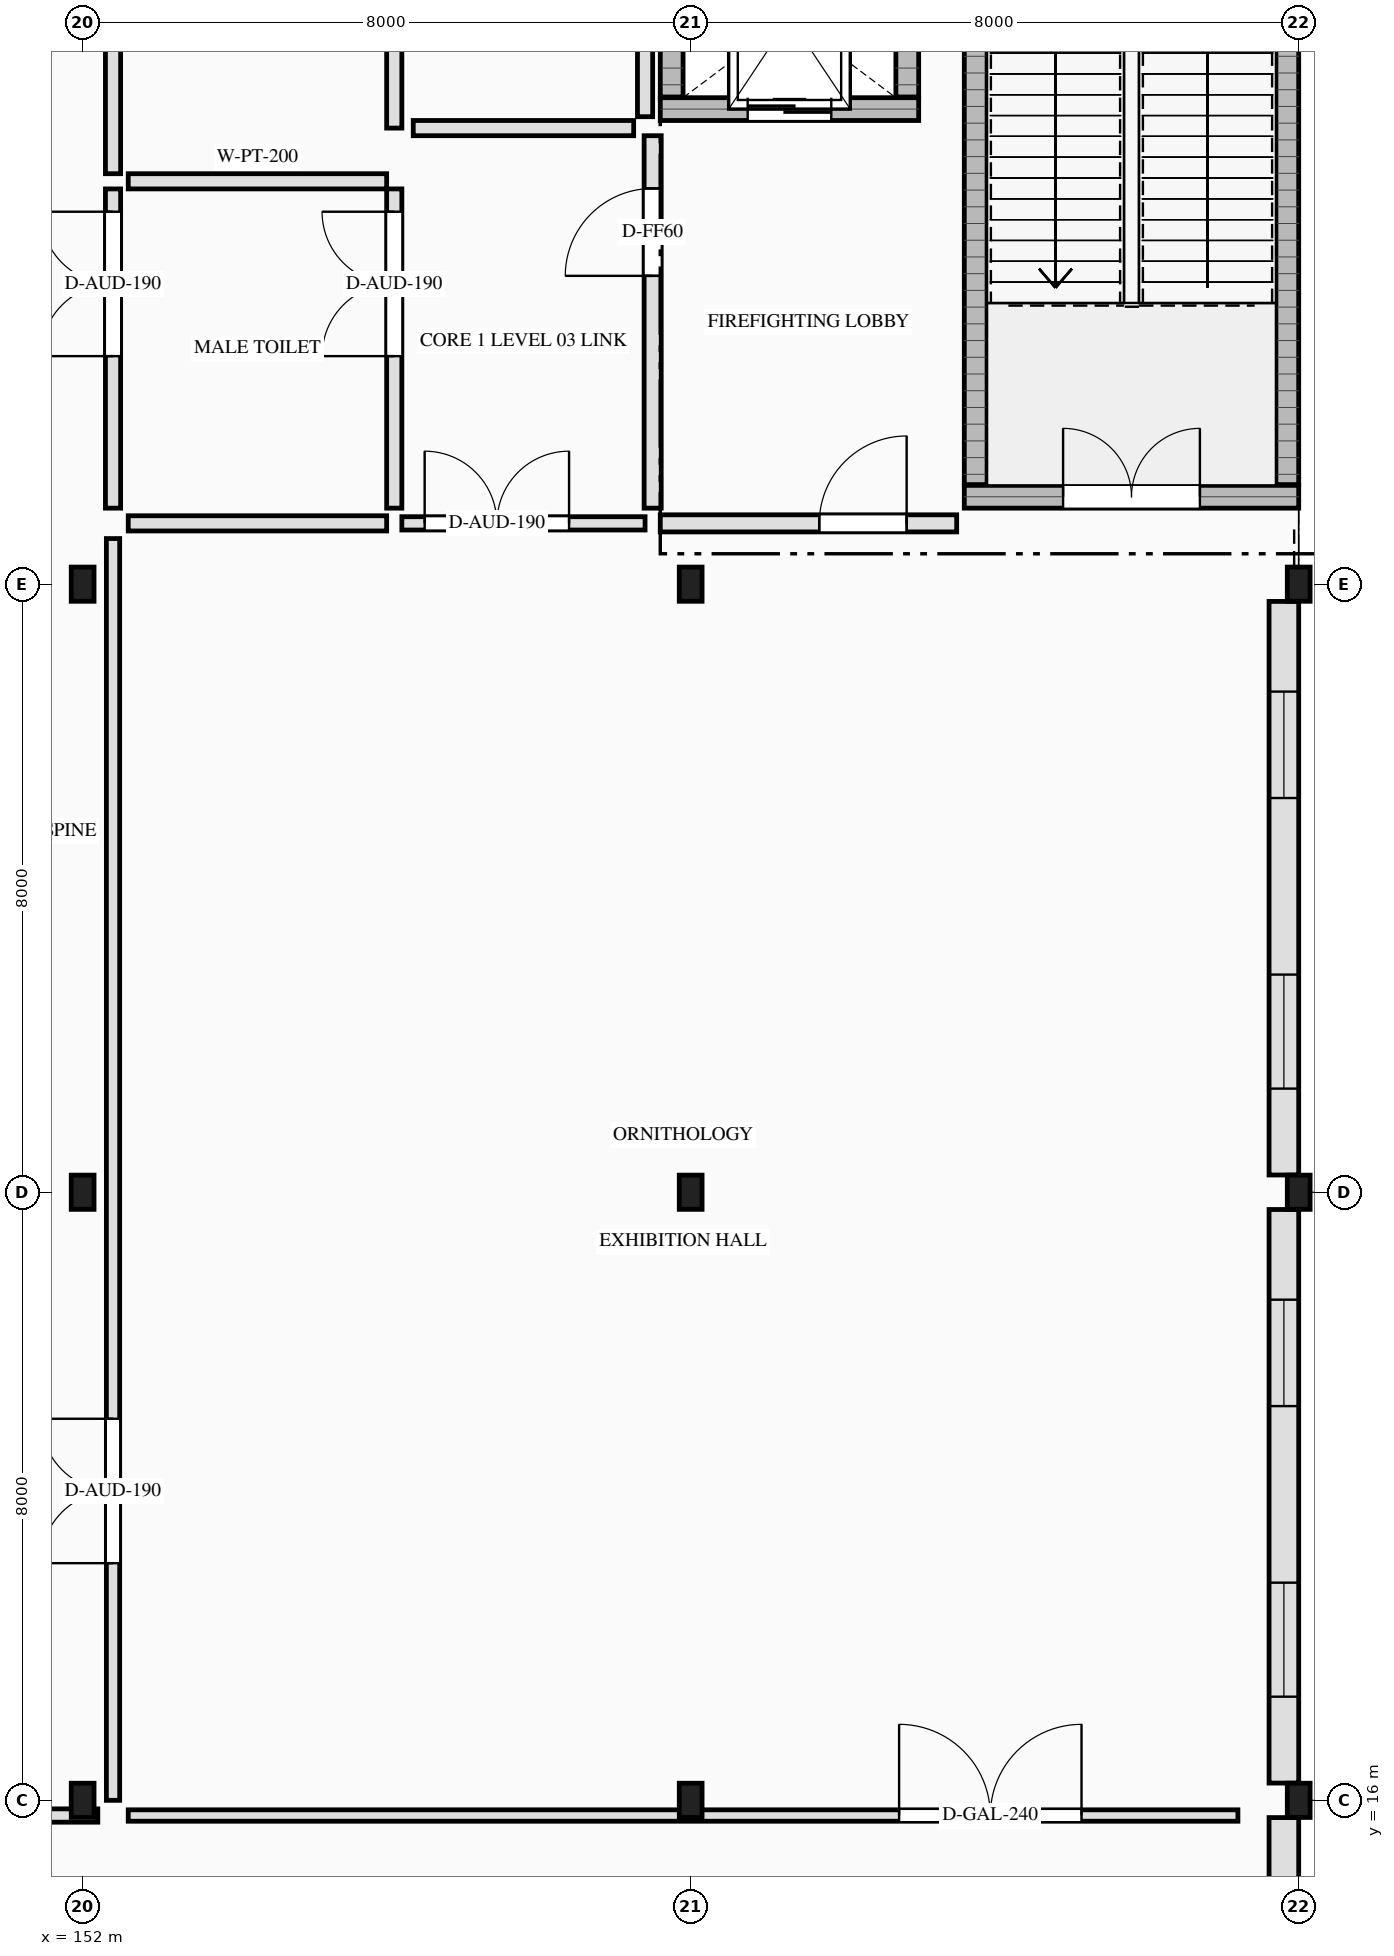
"""IFC4 building model, lengths in metres.
Left out: names, types, materials, properties, quantities, classifications, styles, units other than length and angle.
Written with IfcOpenShell. Run it as: python <this file> out.ifc"""

import sys

from ifc_helpers import new_model, si_unit, direction, frame, frame_2d, origin, origin_2d, place, context, subcontext, project, spatial, rectangle, i_section, extrude, element, fill, save


model = new_model("IFC4")
c1 = context("Model", 3, precision=1e-05, world=origin(), true_north=direction((0.0, 1.0)))
c2 = subcontext(c1, "Body", "Model", "MODEL_VIEW")
j1 = project(units=[si_unit("LENGTHUNIT", "METRE"), si_unit("PLANEANGLEUNIT", "RADIAN")], contexts=[c1])
p1 = place(None, origin())
s1 = spatial("IfcSite", under=j1, at=p1, CompositionType="ELEMENT")
p2 = place(p1, origin())
s2 = spatial("IfcBuilding", under=s1, at=p2, CompositionType="ELEMENT")
p3 = place(p2, frame((0.0, 0.0, 17.6)))
s3 = spatial("IfcBuildingStorey", under=s2, at=p3, CompositionType="ELEMENT", Elevation=17.6)
p4 = place(p3, frame((163.6, 33.15, 0.0), z_axis=(0.0, 0.0, 1.0), x_axis=(1.0, 0.0, 0.0)))
e1 = element("IfcWall", 1, at=p4, inside=s3, PredefinedType="SHEAR", context=c2, shape_type="SweptSolid", body=[
    extrude(rectangle(XDim=4.4, YDim=0.3, at=frame_2d((2.2, 0.0))), origin(), (0.0, 0.0, 1.0), 4.2),
])
p5 = place(p4, frame((1.3, 0.0, 0.0)))
e2 = element("IfcOpeningElement", 2, at=p5, cuts=e1, PredefinedType="OPENING", context=c2, shape_type="SweptSolid", body=[
    extrude(rectangle(XDim=1.8, YDim=2.2, at=frame_2d((0.9, 1.1))), frame((0.0, 0.16, 0.0), z_axis=(0.0, -1.0, 0.0), x_axis=(1.0, 0.0, 0.0)), (0.0, 0.0, 1.0), 0.32),
])
for number, where, z_axis, x_axis in (
    (3, (163.75, 33.31, 0.0), (0.0, 0.0, 1.0), (0.0, 1.0, 0.0)),
    (4, (167.85, 33.31, 0.0), (0.0, 0.0, 1.0), (0.0, 1.0, 0.0)),
):
    element("IfcWall", number, at=place(p3, frame(where, z_axis=z_axis, x_axis=x_axis)), inside=s3, PredefinedType="SHEAR", context=c2, shape_type="SweptSolid", body=[
        extrude(rectangle(XDim=9.38, YDim=0.3, at=frame_2d((4.69, 0.0))), origin(), (0.0, 0.0, 1.0), 4.2),
    ])
p6 = place(p3, frame((159.6, 38.25, 0.0), z_axis=(0.0, 0.0, 1.0), x_axis=(1.0, 0.0, 0.0)))
e5 = element("IfcWall", 5, at=p6, inside=s3, PredefinedType="SHEAR", context=c2, shape_type="SweptSolid", body=[
    extrude(rectangle(XDim=3.4, YDim=0.3, at=frame_2d((1.7, 0.0))), origin(), (0.0, 0.0, 1.0), 4.2),
])
p7 = place(p6, frame((1.15, 0.0, 0.0)))
e6 = element("IfcOpeningElement", 6, at=p7, cuts=e5, PredefinedType="OPENING", context=c2, shape_type="SweptSolid", body=[
    extrude(rectangle(XDim=1.1, YDim=2.15, at=frame_2d((0.55, 1.075))), frame((0.0, 0.16, 0.0), z_axis=(0.0, -1.0, 0.0), x_axis=(1.0, 0.0, 0.0)), (0.0, 0.0, 1.0), 0.32),
])
for number, where, z_axis, x_axis in (
    (7, (159.75, 38.41, 0.0), (0.0, 0.0, 1.0), (0.0, 1.0, 0.0)),
    (8, (162.85, 38.41, 0.0), (0.0, 0.0, 1.0), (0.0, 1.0, 0.0)),
):
    element("IfcWall", number, at=place(p3, frame(where, z_axis=z_axis, x_axis=x_axis)), inside=s3, PredefinedType="SHEAR", context=c2, shape_type="SweptSolid", body=[
        extrude(rectangle(XDim=2.08, YDim=0.3, at=frame_2d((1.04, 0.0))), origin(), (0.0, 0.0, 1.0), 4.2),
    ])
for number, where, z_axis, x_axis in (
    (9, (152.0, 16.0, 0.0), (0.0, 0.0, 1.0), (1.0, 0.0, 0.0)),
    (10, (152.0, 24.0, 0.0), (0.0, 0.0, 1.0), (1.0, 0.0, 0.0)),
    (11, (152.0, 32.0, 0.0), (0.0, 0.0, 1.0), (1.0, 0.0, 0.0)),
    (12, (160.0, 16.0, 0.0), (0.0, 0.0, 1.0), (1.0, 0.0, 0.0)),
    (13, (160.0, 24.0, 0.0), (0.0, 0.0, 1.0), (1.0, 0.0, 0.0)),
    (14, (160.0, 32.0, 0.0), (0.0, 0.0, 1.0), (1.0, 0.0, 0.0)),
    (15, (168.0, 16.0, 0.0), (0.0, 0.0, 1.0), (1.0, 0.0, 0.0)),
    (16, (168.0, 24.0, 0.0), (0.0, 0.0, 1.0), (1.0, 0.0, 0.0)),
    (17, (168.0, 32.0, 0.0), (0.0, 0.0, 1.0), (1.0, 0.0, 0.0)),
):
    element("IfcColumn", number, at=place(p3, frame(where, z_axis=z_axis, x_axis=x_axis)), inside=s3, PredefinedType="COLUMN", context=c2, shape_type="SweptSolid", body=[
        extrude(i_section(OverallWidth=0.3, OverallDepth=0.45, WebThickness=0.014, FlangeThickness=0.026, FilletRadius=0.027, at=origin_2d()), origin(), (0.0, 0.0, 1.0), 4.2),
    ])
p8 = place(p3, frame((167.805, 15.773, 0.0), z_axis=(0.0, 0.0, 1.0), x_axis=(0.0, -1.0, 0.0)))
e18 = element("IfcWall", 18, at=p8, inside=s3, PredefinedType="SOLIDWALL", context=c2, shape_type="SweptSolid", body=[
    extrude(rectangle(XDim=7.546, YDim=0.39, at=frame_2d((3.773, 0.0))), origin(), (0.0, 0.0, 1.0), 3.505),
])
p9 = place(p3, frame((167.805, 23.773, 0.0), z_axis=(0.0, 0.0, 1.0), x_axis=(0.0, -1.0, 0.0)))
e19 = element("IfcWall", 19, at=p9, inside=s3, PredefinedType="SOLIDWALL", context=c2, shape_type="SweptSolid", body=[
    extrude(rectangle(XDim=7.546, YDim=0.39, at=frame_2d((3.773, 0.0))), origin(), (0.0, 0.0, 1.0), 3.505),
])
p10 = place(p9, frame((1.187, 0.0, 0.85)))
e20 = element("IfcOpeningElement", 20, at=p10, cuts=e19, PredefinedType="OPENING", context=c2, shape_type="SweptSolid", body=[
    extrude(rectangle(XDim=1.4, YDim=1.6, at=frame_2d((0.7, 0.8))), frame((0.0, 0.205, 0.0), z_axis=(0.0, -1.0, 0.0), x_axis=(1.0, 0.0, 0.0)), (0.0, 0.0, 1.0), 0.41),
])
p11 = place(p9, frame((4.909, 0.0, 0.85)))
e21 = element("IfcOpeningElement", 21, at=p11, cuts=e19, PredefinedType="OPENING", context=c2, shape_type="SweptSolid", body=[
    extrude(rectangle(XDim=1.5, YDim=2.4, at=frame_2d((0.75, 1.2))), frame((0.0, 0.205, 0.0), z_axis=(0.0, -1.0, 0.0), x_axis=(1.0, 0.0, 0.0)), (0.0, 0.0, 1.0), 0.41),
])
p12 = place(p3, frame((167.805, 31.773, 0.0), z_axis=(0.0, 0.0, 1.0), x_axis=(0.0, -1.0, 0.0)))
e22 = element("IfcWall", 22, at=p12, inside=s3, PredefinedType="SOLIDWALL", context=c2, shape_type="SweptSolid", body=[
    extrude(rectangle(XDim=7.546, YDim=0.39, at=frame_2d((3.773, 0.0))), origin(), (0.0, 0.0, 1.0), 3.505),
])
p13 = place(p12, frame((1.187, 0.0, 0.85)))
e23 = element("IfcOpeningElement", 23, at=p13, cuts=e22, PredefinedType="OPENING", context=c2, shape_type="SweptSolid", body=[
    extrude(rectangle(XDim=1.4, YDim=1.6, at=frame_2d((0.7, 0.8))), frame((0.0, 0.205, 0.0), z_axis=(0.0, -1.0, 0.0), x_axis=(1.0, 0.0, 0.0)), (0.0, 0.0, 1.0), 0.41),
])
p14 = place(p12, frame((4.909, 0.0, 0.85)))
e24 = element("IfcOpeningElement", 24, at=p14, cuts=e22, PredefinedType="OPENING", context=c2, shape_type="SweptSolid", body=[
    extrude(rectangle(XDim=1.5, YDim=2.4, at=frame_2d((0.75, 1.2))), frame((0.0, 0.205, 0.0), z_axis=(0.0, -1.0, 0.0), x_axis=(1.0, 0.0, 0.0)), (0.0, 0.0, 1.0), 0.41),
])
p15 = place(p3, frame((159.5, 33.0, 0.0), z_axis=(0.0, 0.0, 1.0), x_axis=(0.0, 1.0, 0.0)))
e25 = element("IfcWall", 25, at=p15, inside=s3, PredefinedType="SOLIDWALL", context=c2, shape_type="SweptSolid", body=[
    extrude(rectangle(XDim=4.9, YDim=0.225, at=frame_2d((2.45, 0.0))), origin(), (0.0, 0.0, 1.0), 3.96),
])
p16 = place(p15, frame((3.056, 0.0, 0.0)))
e26 = element("IfcOpeningElement", 26, at=p16, cuts=e25, PredefinedType="OPENING", context=c2, shape_type="SweptSolid", body=[
    extrude(rectangle(XDim=1.15, YDim=2.2, at=frame_2d((0.575, 1.1))), frame((0.0, 0.123, 0.0), z_axis=(0.0, -1.0, 0.0), x_axis=(1.0, 0.0, 0.0)), (0.0, 0.0, 1.0), 0.245),
])
p17 = place(p3, frame((159.6, 32.8, 0.0), z_axis=(0.0, 0.0, 1.0), x_axis=(1.0, 0.0, 0.0)))
e27 = element("IfcWall", 27, at=p17, inside=s3, PredefinedType="SOLIDWALL", context=c2, shape_type="SweptSolid", body=[
    extrude(rectangle(XDim=3.9, YDim=0.225, at=frame_2d((1.95, 0.0))), origin(), (0.0, 0.0, 1.0), 3.96),
])
p18 = place(p17, frame((2.092, 0.0, 0.0)))
e28 = element("IfcOpeningElement", 28, at=p18, cuts=e27, PredefinedType="OPENING", context=c2, shape_type="SweptSolid", body=[
    extrude(rectangle(XDim=1.15, YDim=2.2, at=frame_2d((0.575, 1.1))), frame((0.0, 0.123, 0.0), z_axis=(0.0, -1.0, 0.0), x_axis=(1.0, 0.0, 0.0)), (0.0, 0.0, 1.0), 0.245),
])
p19 = place(p3, frame((152.6, 37.3, 0.0), z_axis=(0.0, 0.0, 1.0), x_axis=(1.0, 0.0, 0.0)))
e29 = element("IfcWall", 29, at=p19, inside=s3, PredefinedType="PARTITIONING", context=c2, shape_type="SweptSolid", body=[
    extrude(rectangle(XDim=3.4, YDim=0.2, at=frame_2d((1.7, 0.0))), origin(), (0.0, 0.0, 1.0), 3.96),
])
p20 = place(p3, frame((152.4, 33.0, 0.0), z_axis=(0.0, 0.0, 1.0), x_axis=(0.0, 1.0, 0.0)))
e30 = element("IfcWall", 30, at=p20, inside=s3, PredefinedType="PARTITIONING", context=c2, shape_type="SweptSolid", body=[
    extrude(rectangle(XDim=4.2, YDim=0.2, at=frame_2d((2.1, 0.0))), origin(), (0.0, 0.0, 1.0), 3.96),
])
p21 = place(p20, frame((2.0, 0.0, 0.0)))
e31 = element("IfcOpeningElement", 31, at=p21, cuts=e30, PredefinedType="OPENING", context=c2, shape_type="SweptSolid", body=[
    extrude(rectangle(XDim=1.9, YDim=2.35, at=frame_2d((0.95, 1.175))), frame((0.0, 0.11, 0.0), z_axis=(0.0, -1.0, 0.0), x_axis=(1.0, 0.0, 0.0)), (0.0, 0.0, 1.0), 0.22),
])
p22 = place(p3, frame((156.1, 33.0, 0.0), z_axis=(0.0, 0.0, 1.0), x_axis=(0.0, 1.0, 0.0)))
e32 = element("IfcWall", 32, at=p22, inside=s3, PredefinedType="PARTITIONING", context=c2, shape_type="SweptSolid", body=[
    extrude(rectangle(XDim=4.2, YDim=0.2, at=frame_2d((2.1, 0.0))), origin(), (0.0, 0.0, 1.0), 3.96),
])
p23 = place(p22, frame((2.0, 0.0, 0.0)))
e33 = element("IfcOpeningElement", 33, at=p23, cuts=e32, PredefinedType="OPENING", context=c2, shape_type="SweptSolid", body=[
    extrude(rectangle(XDim=1.9, YDim=2.35, at=frame_2d((0.95, 1.175))), frame((0.0, 0.11, 0.0), z_axis=(0.0, -1.0, 0.0), x_axis=(1.0, 0.0, 0.0)), (0.0, 0.0, 1.0), 0.22),
])
p24 = place(p3, frame((152.6, 32.8, 0.0), z_axis=(0.0, 0.0, 1.0), x_axis=(1.0, 0.0, 0.0)))
e34 = element("IfcWall", 34, at=p24, inside=s3, PredefinedType="PARTITIONING", context=c2, shape_type="SweptSolid", body=[
    extrude(rectangle(XDim=3.4, YDim=0.2, at=frame_2d((1.7, 0.0))), origin(), (0.0, 0.0, 1.0), 3.96),
])
p25 = place(p3, frame((156.1, 38.0, 0.0), z_axis=(0.0, 0.0, 1.0), x_axis=(0.0, 1.0, 0.0)))
e35 = element("IfcWall", 35, at=p25, inside=s3, PredefinedType="PARTITIONING", context=c2, shape_type="SweptSolid", body=[
    extrude(rectangle(XDim=3.6, YDim=0.2, at=frame_2d((1.8, 0.0))), origin(), (0.0, 0.0, 1.0), 3.96),
])
p26 = place(p3, frame((152.4, 37.4, 0.0), z_axis=(0.0, 0.0, 1.0), x_axis=(0.0, 1.0, 0.0)))
e36 = element("IfcWall", 36, at=p26, inside=s3, PredefinedType="PARTITIONING", context=c2, shape_type="SweptSolid", body=[
    extrude(rectangle(XDim=4.2, YDim=0.2, at=frame_2d((2.1, 0.0))), origin(), (0.0, 0.0, 1.0), 3.96),
])
p27 = place(p3, frame((149.0, 15.8, 0.0), z_axis=(0.0, 0.0, 1.0), x_axis=(1.0, 0.0, 0.0)))
e37 = element("IfcWall", 37, at=p27, inside=s3, PredefinedType="PARTITIONING", context=c2, shape_type="SweptSolid", body=[
    extrude(rectangle(XDim=3.2, YDim=0.175, at=frame_2d((1.6, 0.0))), origin(), (0.0, 0.0, 1.0), 3.61),
])
p28 = place(p3, frame((152.4, 16.0, 0.0), z_axis=(0.0, 0.0, 1.0), x_axis=(0.0, 1.0, 0.0)))
e38 = element("IfcWall", 38, at=p28, inside=s3, PredefinedType="PARTITIONING", context=c2, shape_type="SweptSolid", body=[
    extrude(rectangle(XDim=16.6, YDim=0.175, at=frame_2d((8.3, 0.0))), origin(), (0.0, 0.0, 1.0), 3.96),
])
p29 = place(p28, frame((3.12, 0.0, 0.0)))
e39 = element("IfcOpeningElement", 39, at=p29, cuts=e38, PredefinedType="OPENING", context=c2, shape_type="SweptSolid", body=[
    extrude(rectangle(XDim=1.9, YDim=2.35, at=frame_2d((0.95, 1.175))), frame((0.0, 0.097, 0.0), z_axis=(0.0, -1.0, 0.0), x_axis=(1.0, 0.0, 0.0)), (0.0, 0.0, 1.0), 0.195),
])
p30 = place(p3, frame((156.2, 32.8, 0.0), z_axis=(0.0, 0.0, 1.0), x_axis=(1.0, 0.0, 0.0)))
e40 = element("IfcWall", 40, at=p30, inside=s3, PredefinedType="PARTITIONING", context=c2, shape_type="SweptSolid", body=[
    extrude(rectangle(XDim=3.2, YDim=0.175, at=frame_2d((1.6, 0.0))), origin(), (0.0, 0.0, 1.0), 3.96),
])
p31 = place(p30, frame((0.3, 0.0, 0.0)))
e41 = element("IfcOpeningElement", 41, at=p31, cuts=e40, PredefinedType="OPENING", context=c2, shape_type="SweptSolid", body=[
    extrude(rectangle(XDim=1.9, YDim=2.35, at=frame_2d((0.95, 1.175))), frame((0.0, 0.097, 0.0), z_axis=(0.0, -1.0, 0.0), x_axis=(1.0, 0.0, 0.0)), (0.0, 0.0, 1.0), 0.195),
])
p32 = place(p3, frame((152.6, 15.8, 0.0), z_axis=(0.0, 0.0, 1.0), x_axis=(1.0, 0.0, 0.0)))
e42 = element("IfcWall", 42, at=p32, inside=s3, PredefinedType="PARTITIONING", context=c2, shape_type="SweptSolid", body=[
    extrude(rectangle(XDim=14.6, YDim=0.15, at=frame_2d((7.3, 0.0))), origin(), (0.0, 0.0, 1.0), 3.61),
])
p33 = place(p32, frame((10.142, 0.0, 0.0)))
e43 = element("IfcOpeningElement", 43, at=p33, cuts=e42, PredefinedType="OPENING", context=c2, shape_type="SweptSolid", body=[
    extrude(rectangle(XDim=2.4, YDim=2.75, at=frame_2d((1.2, 1.375))), frame((0.0, 0.085, 0.0), z_axis=(0.0, -1.0, 0.0), x_axis=(1.0, 0.0, 0.0)), (0.0, 0.0, 1.0), 0.17),
])
p34 = place(p3, frame((156.35, 38.0, 0.0), z_axis=(0.0, 0.0, 1.0), x_axis=(1.0, 0.0, 0.0)))
e44 = element("IfcWall", 44, at=p34, inside=s3, PredefinedType="PARTITIONING", context=c2, shape_type="SweptSolid", body=[
    extrude(rectangle(XDim=2.9, YDim=0.2, at=frame_2d((1.45, 0.0))), origin(), (0.0, 0.0, 1.0), 3.96),
])
p35 = place(p3, frame((159.4, 38.15, 0.0), z_axis=(0.0, 0.0, 1.0), x_axis=(0.0, 1.0, 0.0)))
e45 = element("IfcWall", 45, at=p35, inside=s3, PredefinedType="PARTITIONING", context=c2, shape_type="SweptSolid", body=[
    extrude(rectangle(XDim=3.3, YDim=0.2, at=frame_2d((1.65, 0.0))), origin(), (0.0, 0.0, 1.0), 3.96),
])
p36 = place(p10, origin())
e46 = element("IfcWindow", 46, at=p36, inside=s3, PartitioningType="SINGLE_PANEL", PredefinedType="WINDOW", context=c2, shape_type="SweptSolid", body=[
    extrude(rectangle(XDim=1.4, YDim=1.6, at=frame_2d((0.7, 0.8))), frame((0.0, 0.03, 0.0), z_axis=(0.0, -1.0, 0.0), x_axis=(1.0, 0.0, 0.0)), (0.0, 0.0, 1.0), 0.06),
])
fill(e20, e46)
p37 = place(p11, origin())
e47 = element("IfcWindow", 47, at=p37, inside=s3, PartitioningType="SINGLE_PANEL", PredefinedType="WINDOW", context=c2, shape_type="SweptSolid", body=[
    extrude(rectangle(XDim=1.5, YDim=2.4, at=frame_2d((0.75, 1.2))), frame((0.0, 0.03, 0.0), z_axis=(0.0, -1.0, 0.0), x_axis=(1.0, 0.0, 0.0)), (0.0, 0.0, 1.0), 0.06),
])
fill(e21, e47)
p38 = place(p13, origin())
e48 = element("IfcWindow", 48, at=p38, inside=s3, PartitioningType="SINGLE_PANEL", PredefinedType="WINDOW", context=c2, shape_type="SweptSolid", body=[
    extrude(rectangle(XDim=1.4, YDim=1.6, at=frame_2d((0.7, 0.8))), frame((0.0, 0.03, 0.0), z_axis=(0.0, -1.0, 0.0), x_axis=(1.0, 0.0, 0.0)), (0.0, 0.0, 1.0), 0.06),
])
fill(e23, e48)
p39 = place(p14, origin())
e49 = element("IfcWindow", 49, at=p39, inside=s3, PartitioningType="SINGLE_PANEL", PredefinedType="WINDOW", context=c2, shape_type="SweptSolid", body=[
    extrude(rectangle(XDim=1.5, YDim=2.4, at=frame_2d((0.75, 1.2))), frame((0.0, 0.03, 0.0), z_axis=(0.0, -1.0, 0.0), x_axis=(1.0, 0.0, 0.0)), (0.0, 0.0, 1.0), 0.06),
])
fill(e24, e49)
p40 = place(p5, origin())
e50 = element("IfcDoor", 50, at=p40, inside=s3, OperationType="DOUBLE_DOOR_SINGLE_SWING", PredefinedType="DOOR", context=c2, shape_type="SweptSolid", body=[
    extrude(rectangle(XDim=1.8, YDim=2.2, at=frame_2d((0.9, 1.1))), frame((0.0, 0.025, 0.0), z_axis=(0.0, -1.0, 0.0), x_axis=(1.0, 0.0, 0.0)), (0.0, 0.0, 1.0), 0.05),
])
fill(e2, e50)
p41 = place(p7, origin())
e51 = element("IfcDoor", 51, at=p41, inside=s3, OperationType="SLIDING_TO_LEFT", PredefinedType="DOOR", context=c2, shape_type="SweptSolid", body=[
    extrude(rectangle(XDim=1.1, YDim=2.15, at=frame_2d((0.55, 1.075))), frame((0.0, 0.025, 0.0), z_axis=(0.0, -1.0, 0.0), x_axis=(1.0, 0.0, 0.0)), (0.0, 0.0, 1.0), 0.05),
])
fill(e6, e51)
p42 = place(p16, origin())
e52 = element("IfcDoor", 52, at=p42, inside=s3, OperationType="SINGLE_SWING_LEFT", PredefinedType="DOOR", context=c2, shape_type="SweptSolid", body=[
    extrude(rectangle(XDim=1.15, YDim=2.2, at=frame_2d((0.575, 1.1))), frame((0.0, 0.025, 0.0), z_axis=(0.0, -1.0, 0.0), x_axis=(1.0, 0.0, 0.0)), (0.0, 0.0, 1.0), 0.05),
])
fill(e26, e52)
p43 = place(p18, origin())
e53 = element("IfcDoor", 53, at=p43, inside=s3, OperationType="SINGLE_SWING_RIGHT", PredefinedType="DOOR", context=c2, shape_type="SweptSolid", body=[
    extrude(rectangle(XDim=1.15, YDim=2.2, at=frame_2d((0.575, 1.1))), frame((0.0, 0.025, 0.0), z_axis=(0.0, -1.0, 0.0), x_axis=(1.0, 0.0, 0.0)), (0.0, 0.0, 1.0), 0.05),
])
fill(e28, e53)
p44 = place(p21, origin())
e54 = element("IfcDoor", 54, at=p44, inside=s3, OperationType="DOUBLE_DOOR_SINGLE_SWING", PredefinedType="DOOR", context=c2, shape_type="SweptSolid", body=[
    extrude(rectangle(XDim=1.9, YDim=2.35, at=frame_2d((0.95, 1.175))), frame((0.0, 0.025, 0.0), z_axis=(0.0, -1.0, 0.0), x_axis=(1.0, 0.0, 0.0)), (0.0, 0.0, 1.0), 0.05),
])
fill(e31, e54)
p45 = place(p23, origin())
e55 = element("IfcDoor", 55, at=p45, inside=s3, OperationType="DOUBLE_DOOR_SINGLE_SWING", PredefinedType="DOOR", context=c2, shape_type="SweptSolid", body=[
    extrude(rectangle(XDim=1.9, YDim=2.35, at=frame_2d((0.95, 1.175))), frame((0.0, 0.025, 0.0), z_axis=(0.0, -1.0, 0.0), x_axis=(1.0, 0.0, 0.0)), (0.0, 0.0, 1.0), 0.05),
])
fill(e33, e55)
p46 = place(p29, origin())
e56 = element("IfcDoor", 56, at=p46, inside=s3, OperationType="DOUBLE_DOOR_SINGLE_SWING", PredefinedType="DOOR", context=c2, shape_type="SweptSolid", body=[
    extrude(rectangle(XDim=1.9, YDim=2.35, at=frame_2d((0.95, 1.175))), frame((0.0, 0.025, 0.0), z_axis=(0.0, -1.0, 0.0), x_axis=(1.0, 0.0, 0.0)), (0.0, 0.0, 1.0), 0.05),
])
fill(e39, e56)
p47 = place(p31, origin())
e57 = element("IfcDoor", 57, at=p47, inside=s3, OperationType="DOUBLE_DOOR_SINGLE_SWING", PredefinedType="DOOR", context=c2, shape_type="SweptSolid", body=[
    extrude(rectangle(XDim=1.9, YDim=2.35, at=frame_2d((0.95, 1.175))), frame((0.0, 0.025, 0.0), z_axis=(0.0, -1.0, 0.0), x_axis=(1.0, 0.0, 0.0)), (0.0, 0.0, 1.0), 0.05),
])
fill(e41, e57)
p48 = place(p33, origin())
e58 = element("IfcDoor", 58, at=p48, inside=s3, OperationType="DOUBLE_DOOR_DOUBLE_SWING", PredefinedType="DOOR", context=c2, shape_type="SweptSolid", body=[
    extrude(rectangle(XDim=2.4, YDim=2.75, at=frame_2d((1.2, 1.375))), frame((0.0, 0.025, 0.0), z_axis=(0.0, -1.0, 0.0), x_axis=(1.0, 0.0, 0.0)), (0.0, 0.0, 1.0), 0.05),
])
fill(e43, e58)
save(model, sys.argv[1])
